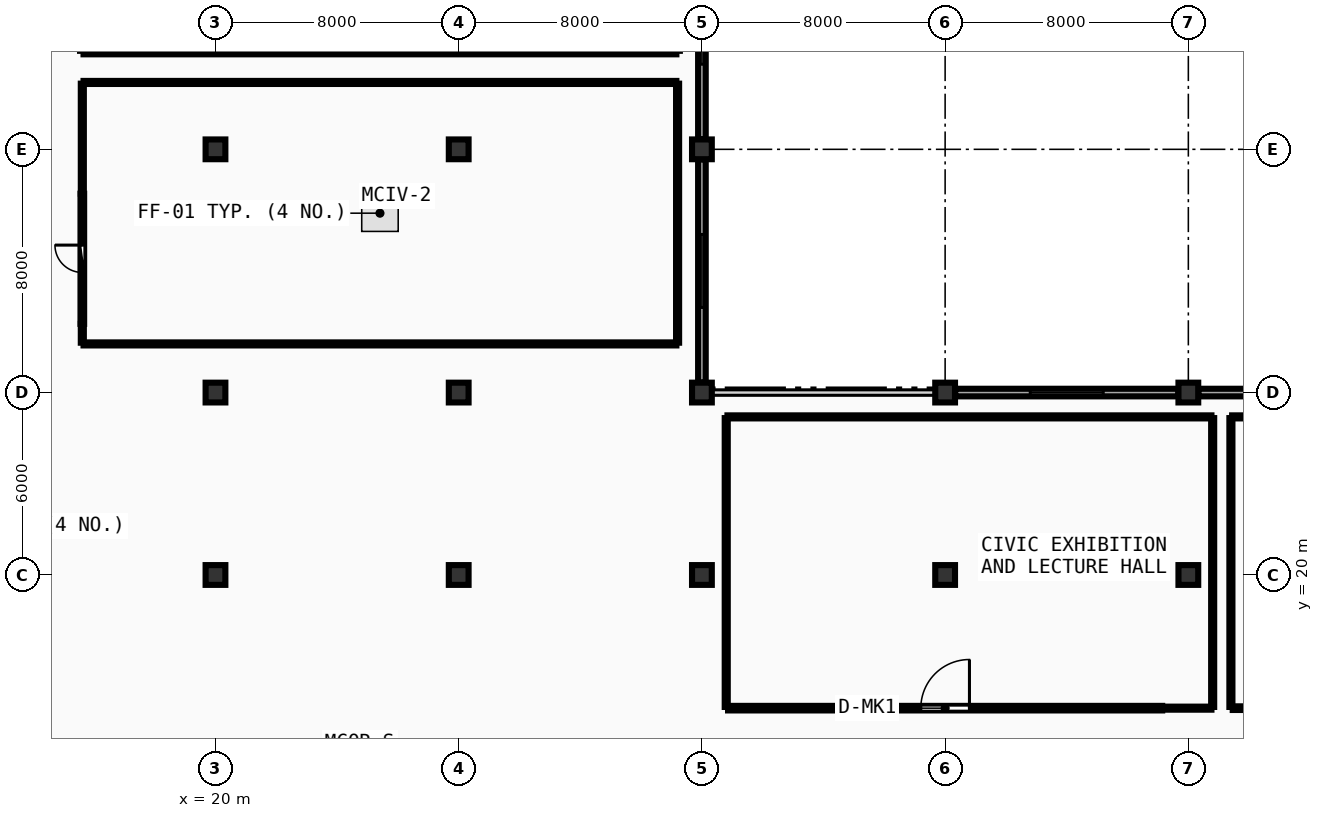
"""IFC4 building model, lengths in metres.
Left out: names, types, materials, properties, quantities, classifications, styles, units other than length and angle.
Written with IfcOpenShell. Run it as: python <this file> out.ifc"""

import sys

from ifc_helpers import new_model, si_unit, direction, frame, frame_2d, origin, origin_2d, place, context, subcontext, project, spatial, rectangle, extrude, element, fill, save


model = new_model("IFC4")
c1 = context("Model", 3, precision=1e-05, world=origin(), true_north=direction((0.0, 1.0)))
c2 = subcontext(c1, "Body", "Model", "MODEL_VIEW")
j1 = project(units=[si_unit("LENGTHUNIT", "METRE"), si_unit("PLANEANGLEUNIT", "RADIAN")], contexts=[c1])
p1 = place(None, origin())
s1 = spatial("IfcSite", under=j1, at=p1, CompositionType="ELEMENT")
p2 = place(p1, origin())
s2 = spatial("IfcBuilding", under=s1, at=p2, CompositionType="ELEMENT")
p3 = place(p2, frame((0.0, 0.0, 18.0)))
s3 = spatial("IfcBuildingStorey", under=s2, at=p3, CompositionType="ELEMENT", Elevation=18.0)
for number, where, z_axis, x_axis in (
    (1, (20.0, 20.0, 0.0), (0.0, 0.0, 1.0), (1.0, 0.0, 0.0)),
    (2, (20.0, 26.0, 0.0), (0.0, 0.0, 1.0), (1.0, 0.0, 0.0)),
    (3, (20.0, 34.0, 0.0), (0.0, 0.0, 1.0), (1.0, 0.0, 0.0)),
    (4, (28.0, 20.0, 0.0), (0.0, 0.0, 1.0), (1.0, 0.0, 0.0)),
    (5, (28.0, 26.0, 0.0), (0.0, 0.0, 1.0), (1.0, 0.0, 0.0)),
    (6, (28.0, 34.0, 0.0), (0.0, 0.0, 1.0), (1.0, 0.0, 0.0)),
    (7, (36.0, 20.0, 0.0), (0.0, 0.0, 1.0), (1.0, 0.0, 0.0)),
    (8, (36.0, 26.0, 0.0), (0.0, 0.0, 1.0), (1.0, 0.0, 0.0)),
    (9, (36.0, 34.0, 0.0), (0.0, 0.0, 1.0), (1.0, 0.0, 0.0)),
    (10, (44.0, 20.0, 0.0), (0.0, 0.0, 1.0), (1.0, 0.0, 0.0)),
    (11, (44.0, 26.0, 0.0), (0.0, 0.0, 1.0), (1.0, 0.0, 0.0)),
    (12, (52.0, 20.0, 0.0), (0.0, 0.0, 1.0), (1.0, 0.0, 0.0)),
    (13, (52.0, 26.0, 0.0), (0.0, 0.0, 1.0), (1.0, 0.0, 0.0)),
):
    element("IfcColumn", number, at=place(p3, frame(where, z_axis=z_axis, x_axis=x_axis)), inside=s3, PredefinedType="COLUMN", context=c2, shape_type="SweptSolid", body=[
        extrude(rectangle(XDim=0.65, YDim=0.65, at=origin_2d()), origin(), (0.0, 0.0, 1.0), 4.5),
    ])
p4 = place(p3, frame((53.016, 41.582, 0.0), z_axis=(0.0, 0.0, 1.0), x_axis=(0.80030733173, -0.599590005569, 0.0)))
e14 = element("IfcWall", 14, at=p4, inside=s3, PredefinedType="SOLIDWALL", context=c2, shape_type="SweptSolid", body=[
    extrude(rectangle(XDim=8.291, YDim=0.26, at=frame_2d((4.145, 0.0))), origin(), (0.0, 0.0, 1.0), 4.225),
])
p5 = place(p4, frame((3.145, 0.0, 0.85)))
e15 = element("IfcOpeningElement", 15, at=p5, cuts=e14, PredefinedType="OPENING", context=c2, shape_type="SweptSolid", body=[
    extrude(rectangle(XDim=2.0, YDim=1.75, at=frame_2d((1.0, 0.875))), frame((0.0, 0.14, 0.0), z_axis=(0.0, -1.0, 0.0), x_axis=(1.0, 0.0, 0.0)), (0.0, 0.0, 1.0), 0.28),
])
p6 = place(p3, frame((59.67, 26.0, 0.0), z_axis=(0.0, 0.0, 1.0), x_axis=(-1.0, 0.0, 0.0)))
e16 = element("IfcWall", 16, at=p6, inside=s3, PredefinedType="SOLIDWALL", context=c2, shape_type="SweptSolid", body=[
    extrude(rectangle(XDim=7.34, YDim=0.25, at=frame_2d((3.67, 0.0))), origin(), (0.0, 0.0, 1.0), 3.44),
])
p7 = place(p6, frame((2.47, 0.0, 0.95)))
e17 = element("IfcOpeningElement", 17, at=p7, cuts=e16, PredefinedType="OPENING", context=c2, shape_type="SweptSolid", body=[
    extrude(rectangle(XDim=2.4, YDim=1.65, at=frame_2d((1.2, 0.825))), frame((0.0, 0.135, 0.0), z_axis=(0.0, -1.0, 0.0), x_axis=(1.0, 0.0, 0.0)), (0.0, 0.0, 1.0), 0.27),
])
p8 = place(p3, frame((51.67, 26.0, 0.0), z_axis=(0.0, 0.0, 1.0), x_axis=(-1.0, 0.0, 0.0)))
e18 = element("IfcWall", 18, at=p8, inside=s3, PredefinedType="SOLIDWALL", context=c2, shape_type="SweptSolid", body=[
    extrude(rectangle(XDim=7.34, YDim=0.25, at=frame_2d((3.67, 0.0))), origin(), (0.0, 0.0, 1.0), 3.44),
])
p9 = place(p8, frame((2.47, 0.0, 0.95)))
e19 = element("IfcOpeningElement", 19, at=p9, cuts=e18, PredefinedType="OPENING", context=c2, shape_type="SweptSolid", body=[
    extrude(rectangle(XDim=2.4, YDim=1.65, at=frame_2d((1.2, 0.825))), frame((0.0, 0.135, 0.0), z_axis=(0.0, -1.0, 0.0), x_axis=(1.0, 0.0, 0.0)), (0.0, 0.0, 1.0), 0.27),
])
p10 = place(p3, frame((36.0, 26.33, 0.0), z_axis=(0.0, 0.0, 1.0), x_axis=(0.0, 1.0, 0.0)))
e20 = element("IfcWall", 20, at=p10, inside=s3, PredefinedType="SOLIDWALL", context=c2, shape_type="SweptSolid", body=[
    extrude(rectangle(XDim=7.34, YDim=0.25, at=frame_2d((3.67, 0.0))), origin(), (0.0, 0.0, 1.0), 3.44),
])
p11 = place(p10, frame((2.47, 0.0, 0.95)))
e21 = element("IfcOpeningElement", 21, at=p11, cuts=e20, PredefinedType="OPENING", context=c2, shape_type="SweptSolid", body=[
    extrude(rectangle(XDim=2.4, YDim=1.65, at=frame_2d((1.2, 0.825))), frame((0.0, 0.135, 0.0), z_axis=(0.0, -1.0, 0.0), x_axis=(1.0, 0.0, 0.0)), (0.0, 0.0, 1.0), 0.27),
])
p12 = place(p3, frame((36.0, 34.33, 0.0), z_axis=(0.0, 0.0, 1.0), x_axis=(0.0, 1.0, 0.0)))
e22 = element("IfcWall", 22, at=p12, inside=s3, PredefinedType="SOLIDWALL", context=c2, shape_type="SweptSolid", body=[
    extrude(rectangle(XDim=7.34, YDim=0.25, at=frame_2d((3.67, 0.0))), origin(), (0.0, 0.0, 1.0), 3.44),
])
p13 = place(p12, frame((2.47, 0.0, 0.95)))
e23 = element("IfcOpeningElement", 23, at=p13, cuts=e22, PredefinedType="OPENING", context=c2, shape_type="SweptSolid", body=[
    extrude(rectangle(XDim=2.4, YDim=1.65, at=frame_2d((1.2, 0.825))), frame((0.0, 0.135, 0.0), z_axis=(0.0, -1.0, 0.0), x_axis=(1.0, 0.0, 0.0)), (0.0, 0.0, 1.0), 0.27),
])
p14 = place(p3, frame((36.86, 15.62, 0.0), z_axis=(0.0, 0.0, 1.0), x_axis=(1.0, 0.0, 0.0)))
e24 = element("IfcWall", 24, at=p14, inside=s3, PredefinedType="PARTITIONING", context=c2, shape_type="SweptSolid", body=[
    extrude(rectangle(XDim=14.28, YDim=0.15, at=frame_2d((7.14, 0.0))), origin(), (0.0, 0.0, 1.0), 3.445),
])
p15 = place(p14, frame((6.34, 0.0, 0.0)))
e25 = element("IfcOpeningElement", 25, at=p15, cuts=e24, PredefinedType="OPENING", context=c2, shape_type="SweptSolid", body=[
    extrude(rectangle(XDim=1.6, YDim=2.15, at=frame_2d((0.8, 1.075))), frame((0.0, 0.085, 0.0), z_axis=(0.0, -1.0, 0.0), x_axis=(1.0, 0.0, 0.0)), (0.0, 0.0, 1.0), 0.17),
])
p16 = place(p3, frame((53.46, 15.62, 0.0), z_axis=(0.0, 0.0, 1.0), x_axis=(1.0, 0.0, 0.0)))
e26 = element("IfcWall", 26, at=p16, inside=s3, PredefinedType="PARTITIONING", context=c2, shape_type="SweptSolid", body=[
    extrude(rectangle(XDim=25.68, YDim=0.12, at=frame_2d((12.84, 0.0))), origin(), (0.0, 0.0, 1.0), 3.445),
])
p17 = place(p16, frame((12.39, 0.0, 0.0)))
e27 = element("IfcOpeningElement", 27, at=p17, cuts=e26, PredefinedType="OPENING", context=c2, shape_type="SweptSolid", body=[
    extrude(rectangle(XDim=0.9, YDim=2.08, at=frame_2d((0.45, 1.04))), frame((0.0, 0.07, 0.0), z_axis=(0.0, -1.0, 0.0), x_axis=(1.0, 0.0, 0.0)), (0.0, 0.0, 1.0), 0.14),
])
p18 = place(p3, frame((15.62, 28.26, 0.0), z_axis=(0.0, 0.0, 1.0), x_axis=(0.0, 1.0, 0.0)))
e28 = element("IfcWall", 28, at=p18, inside=s3, PredefinedType="PARTITIONING", context=c2, shape_type="SweptSolid", body=[
    extrude(rectangle(XDim=4.28, YDim=0.12, at=frame_2d((2.14, 0.0))), origin(), (0.0, 0.0, 1.0), 4.23),
])
p19 = place(p18, frame((1.69, 0.0, 0.0)))
e29 = element("IfcOpeningElement", 29, at=p19, cuts=e28, PredefinedType="OPENING", context=c2, shape_type="SweptSolid", body=[
    extrude(rectangle(XDim=0.9, YDim=2.08, at=frame_2d((0.45, 1.04))), frame((0.0, 0.07, 0.0), z_axis=(0.0, -1.0, 0.0), x_axis=(1.0, 0.0, 0.0)), (0.0, 0.0, 1.0), 0.14),
])
p20 = place(p3, frame((51.14, 15.62, 0.0), z_axis=(0.0, 0.0, 1.0), x_axis=(1.0, 0.0, 0.0)))
e30 = element("IfcWall", 30, at=p20, inside=s3, PredefinedType="PARTITIONING", context=c2, shape_type="SweptSolid", body=[
    extrude(rectangle(XDim=1.62, YDim=0.1, at=frame_2d((0.81, 0.0))), origin(), (0.0, 0.0, 1.0), 3.445),
])
p21 = place(p3, frame((52.8, 15.66, 0.0), z_axis=(0.0, 0.0, 1.0), x_axis=(0.0, 1.0, 0.0)))
e31 = element("IfcWall", 31, at=p21, inside=s3, PredefinedType="PARTITIONING", context=c2, shape_type="SweptSolid", body=[
    extrude(rectangle(XDim=9.5, YDim=0.1, at=frame_2d((4.75, 0.0))), origin(), (0.0, 0.0, 1.0), 3.445),
])
p22 = place(p3, frame((52.76, 25.2, 0.0), z_axis=(0.0, 0.0, 1.0), x_axis=(-1.0, 0.0, 0.0)))
e32 = element("IfcWall", 32, at=p22, inside=s3, PredefinedType="PARTITIONING", context=c2, shape_type="SweptSolid", body=[
    extrude(rectangle(XDim=15.92, YDim=0.1, at=frame_2d((7.96, 0.0))), origin(), (0.0, 0.0, 1.0), 3.445),
])
p23 = place(p3, frame((36.8, 25.16, 0.0), z_axis=(0.0, 0.0, 1.0), x_axis=(0.0, -1.0, 0.0)))
e33 = element("IfcWall", 33, at=p23, inside=s3, PredefinedType="PARTITIONING", context=c2, shape_type="SweptSolid", body=[
    extrude(rectangle(XDim=9.5, YDim=0.1, at=frame_2d((4.75, 0.0))), origin(), (0.0, 0.0, 1.0), 3.445),
])
p24 = place(p3, frame((95.16, 25.2, 0.0), z_axis=(0.0, 0.0, 1.0), x_axis=(-1.0, 0.0, 0.0)))
e34 = element("IfcWall", 34, at=p24, inside=s3, PredefinedType="PARTITIONING", context=c2, shape_type="SweptSolid", body=[
    extrude(rectangle(XDim=41.72, YDim=0.1, at=frame_2d((20.86, 0.0))), origin(), (0.0, 0.0, 1.0), 3.445),
])
p25 = place(p3, frame((53.4, 25.16, 0.0), z_axis=(0.0, 0.0, 1.0), x_axis=(0.0, -1.0, 0.0)))
e35 = element("IfcWall", 35, at=p25, inside=s3, PredefinedType="PARTITIONING", context=c2, shape_type="SweptSolid", body=[
    extrude(rectangle(XDim=9.5, YDim=0.1, at=frame_2d((4.75, 0.0))), origin(), (0.0, 0.0, 1.0), 3.445),
])
p26 = place(p3, frame((15.66, 27.6, 0.0), z_axis=(0.0, 0.0, 1.0), x_axis=(1.0, 0.0, 0.0)))
e36 = element("IfcWall", 36, at=p26, inside=s3, PredefinedType="PARTITIONING", context=c2, shape_type="SweptSolid", body=[
    extrude(rectangle(XDim=19.5, YDim=0.1, at=frame_2d((9.75, 0.0))), origin(), (0.0, 0.0, 1.0), 3.445),
])
p27 = place(p3, frame((35.2, 27.64, 0.0), z_axis=(0.0, 0.0, 1.0), x_axis=(0.0, 1.0, 0.0)))
e37 = element("IfcWall", 37, at=p27, inside=s3, PredefinedType="PARTITIONING", context=c2, shape_type="SweptSolid", body=[
    extrude(rectangle(XDim=8.52, YDim=0.1, at=frame_2d((4.26, 0.0))), origin(), (0.0, 0.0, 1.0), 3.445),
])
p28 = place(p3, frame((35.16, 36.2, 0.0), z_axis=(0.0, 0.0, 1.0), x_axis=(-1.0, 0.0, 0.0)))
e38 = element("IfcWall", 38, at=p28, inside=s3, PredefinedType="PARTITIONING", context=c2, shape_type="SweptSolid", body=[
    extrude(rectangle(XDim=19.5, YDim=0.1, at=frame_2d((9.75, 0.0))), origin(), (0.0, 0.0, 1.0), 3.445),
])
p29 = place(p3, frame((15.62, 36.16, 0.0), z_axis=(0.0, 0.0, 1.0), x_axis=(0.0, -1.0, 0.0)))
e39 = element("IfcWall", 39, at=p29, inside=s3, PredefinedType="PARTITIONING", context=c2, shape_type="SweptSolid", body=[
    extrude(rectangle(XDim=3.62, YDim=0.1, at=frame_2d((1.81, 0.0))), origin(), (0.0, 0.0, 1.0), 3.445),
])
p30 = place(p3, frame((15.62, 28.26, 0.0), z_axis=(0.0, 0.0, 1.0), x_axis=(0.0, -1.0, 0.0)))
e40 = element("IfcWall", 40, at=p30, inside=s3, PredefinedType="PARTITIONING", context=c2, shape_type="SweptSolid", body=[
    extrude(rectangle(XDim=0.62, YDim=0.1, at=frame_2d((0.31, 0.0))), origin(), (0.0, 0.0, 1.0), 4.23),
])
p31 = place(p3, frame((15.66, 37.2, 0.0), z_axis=(0.0, 0.0, 1.0), x_axis=(1.0, 0.0, 0.0)))
e41 = element("IfcWall", 41, at=p31, inside=s3, PredefinedType="PARTITIONING", context=c2, shape_type="SweptSolid", body=[
    extrude(rectangle(XDim=19.5, YDim=0.15, at=frame_2d((9.75, 0.0))), origin(), (0.0, 0.0, 1.0), 3.445),
])
p32 = place(p9, origin())
e42 = element("IfcWindow", 42, at=p32, inside=s3, PartitioningType="SINGLE_PANEL", PredefinedType="WINDOW", context=c2, shape_type="SweptSolid", body=[
    extrude(rectangle(XDim=2.4, YDim=1.65, at=frame_2d((1.2, 0.825))), frame((0.0, 0.03, 0.0), z_axis=(0.0, -1.0, 0.0), x_axis=(1.0, 0.0, 0.0)), (0.0, 0.0, 1.0), 0.06),
])
fill(e19, e42)
p33 = place(p11, origin())
e43 = element("IfcWindow", 43, at=p33, inside=s3, PartitioningType="SINGLE_PANEL", PredefinedType="WINDOW", context=c2, shape_type="SweptSolid", body=[
    extrude(rectangle(XDim=2.4, YDim=1.65, at=frame_2d((1.2, 0.825))), frame((0.0, 0.03, 0.0), z_axis=(0.0, -1.0, 0.0), x_axis=(1.0, 0.0, 0.0)), (0.0, 0.0, 1.0), 0.06),
])
fill(e21, e43)
p34 = place(p13, origin())
e44 = element("IfcWindow", 44, at=p34, inside=s3, PartitioningType="SINGLE_PANEL", PredefinedType="WINDOW", context=c2, shape_type="SweptSolid", body=[
    extrude(rectangle(XDim=2.4, YDim=1.65, at=frame_2d((1.2, 0.825))), frame((0.0, 0.03, 0.0), z_axis=(0.0, -1.0, 0.0), x_axis=(1.0, 0.0, 0.0)), (0.0, 0.0, 1.0), 0.06),
])
fill(e23, e44)
p35 = place(p15, origin())
e45 = element("IfcDoor", 45, at=p35, inside=s3, OperationType="SINGLE_SWING_RIGHT", PredefinedType="DOOR", context=c2, shape_type="SweptSolid", body=[
    extrude(rectangle(XDim=1.6, YDim=2.15, at=frame_2d((0.8, 1.075))), frame((0.0, 0.025, 0.0), z_axis=(0.0, -1.0, 0.0), x_axis=(1.0, 0.0, 0.0)), (0.0, 0.0, 1.0), 0.05),
])
fill(e25, e45)
p36 = place(p19, origin())
e46 = element("IfcDoor", 46, at=p36, inside=s3, OperationType="SINGLE_SWING_RIGHT", PredefinedType="DOOR", context=c2, shape_type="SweptSolid", body=[
    extrude(rectangle(XDim=0.9, YDim=2.08, at=frame_2d((0.45, 1.04))), frame((0.0, 0.025, 0.0), z_axis=(0.0, -1.0, 0.0), x_axis=(1.0, 0.0, 0.0)), (0.0, 0.0, 1.0), 0.05),
])
fill(e29, e46)
save(model, sys.argv[1])
